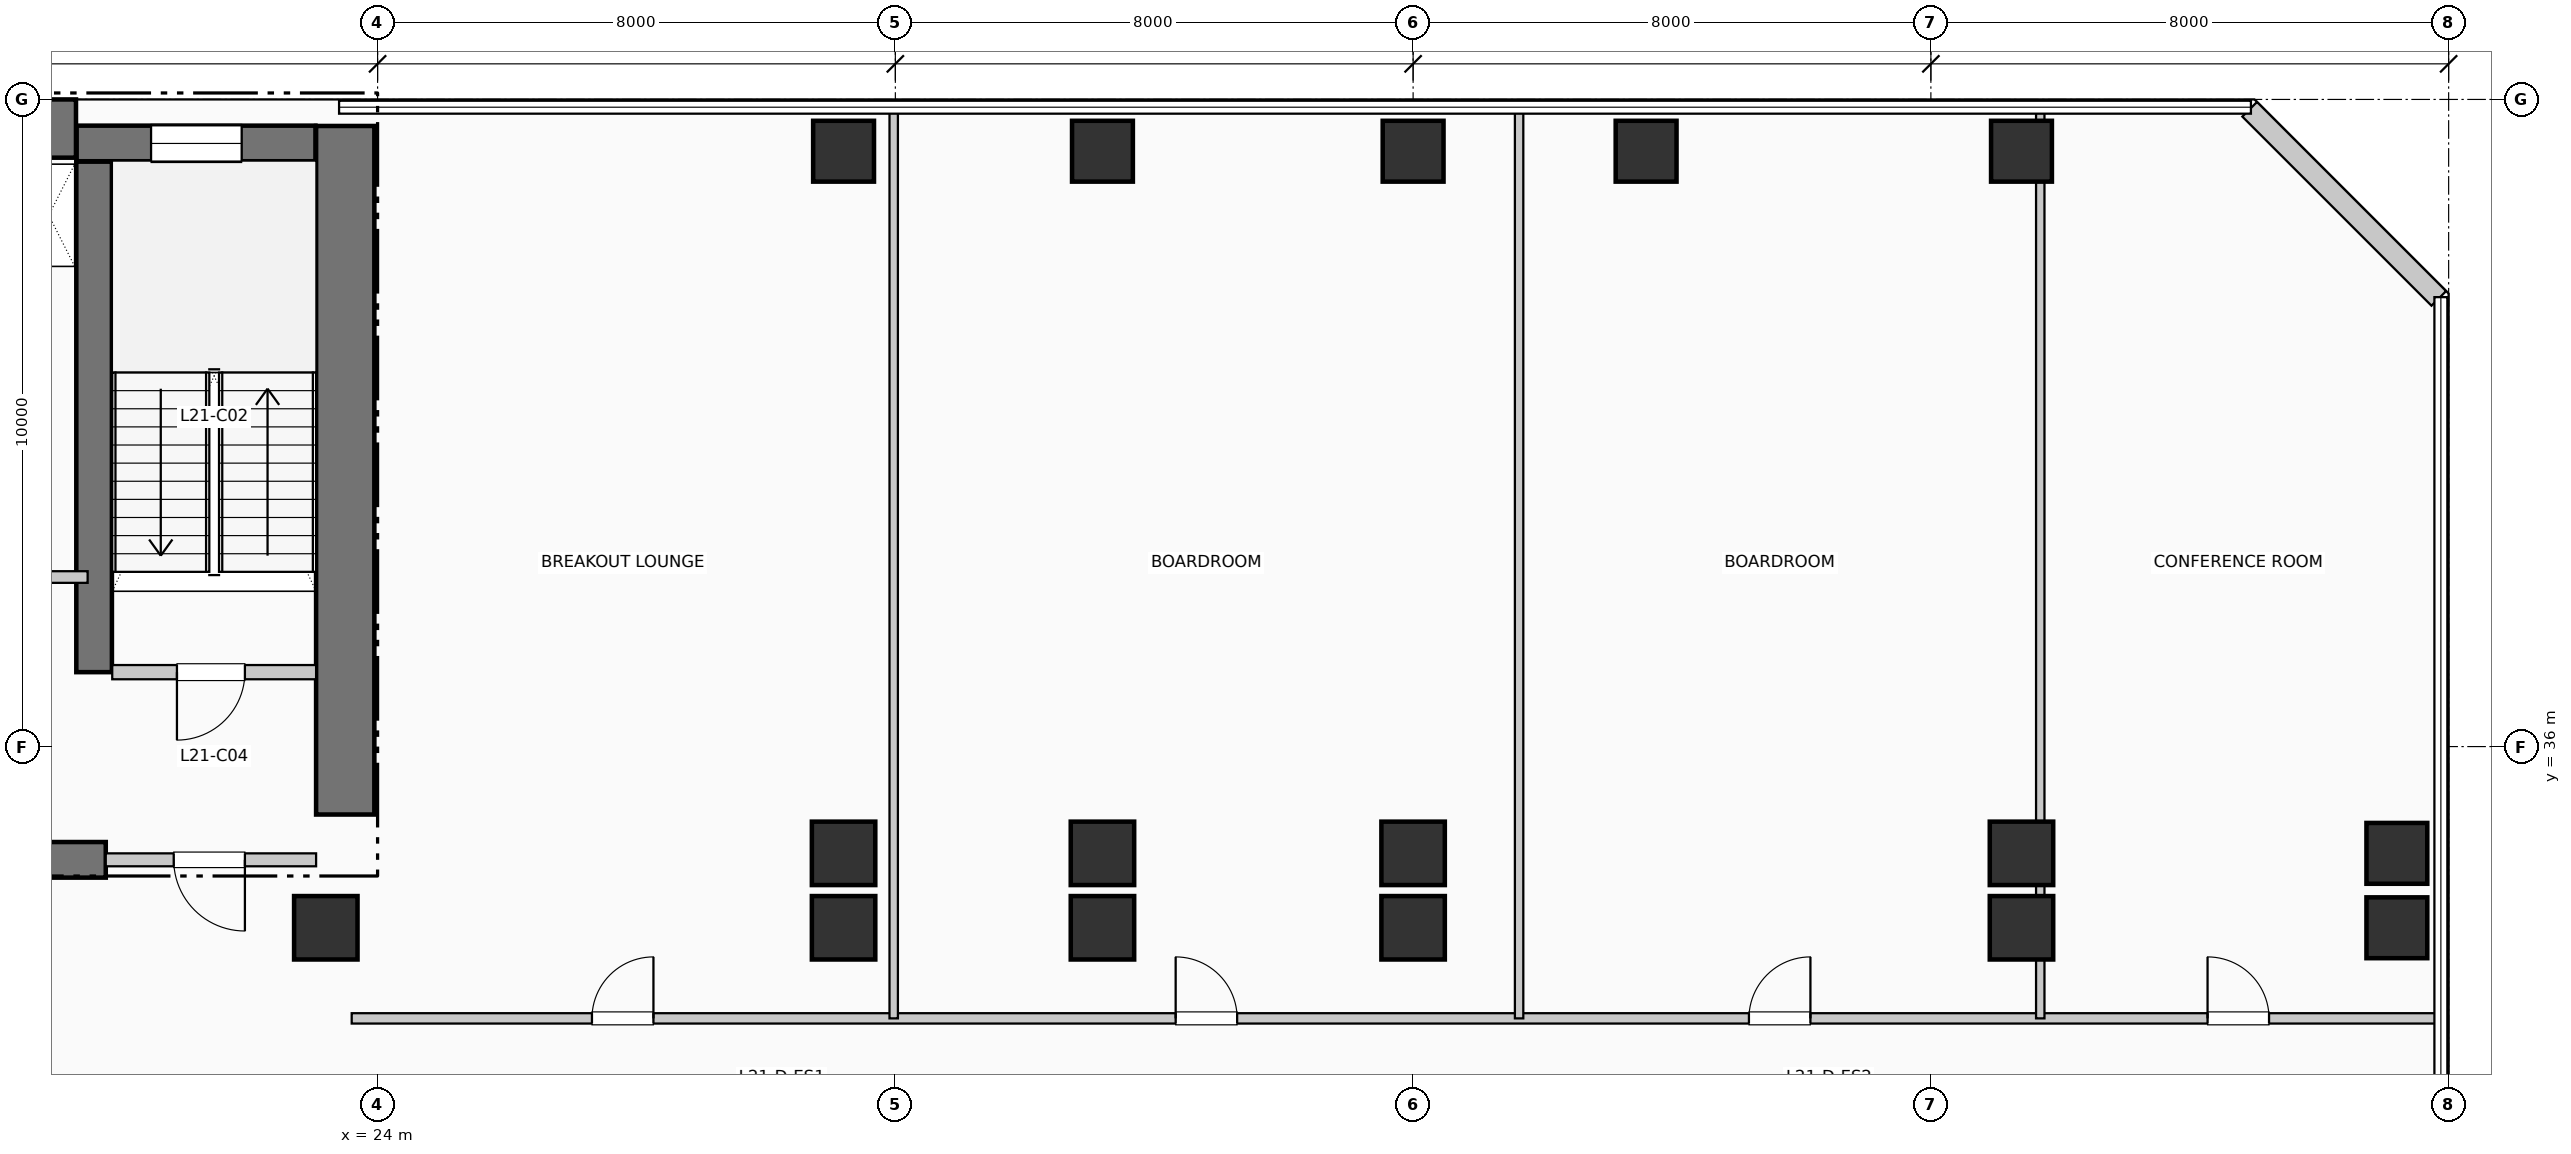
"""IFC4 building model, lengths in metres.
Left out: names, types, materials, properties, quantities, classifications, styles, units other than length and angle.
Written with IfcOpenShell. Run it as: python <this file> out.ifc"""

import sys

from ifc_helpers import new_model, si_unit, direction, frame, frame_2d, origin, origin_2d, place, context, subcontext, project, spatial, rectangle, extrude, element, fill, save


model = new_model("IFC4")
c1 = context("Model", 3, precision=1e-05, world=origin(), true_north=direction((0.0, 1.0)))
c2 = subcontext(c1, "Body", "Model", "MODEL_VIEW")
j1 = project(units=[si_unit("LENGTHUNIT", "METRE"), si_unit("PLANEANGLEUNIT", "RADIAN")], contexts=[c1])
p1 = place(None, origin())
s1 = spatial("IfcSite", under=j1, at=p1, CompositionType="ELEMENT")
p2 = place(p1, origin())
s2 = spatial("IfcBuilding", under=s1, at=p2, CompositionType="ELEMENT")
p3 = place(p2, frame((0.0, 0.0, 89.76)))
s3 = spatial("IfcBuildingStorey", under=s2, at=p3, CompositionType="ELEMENT", Elevation=89.76)
p4 = place(p3, frame((5.36, 45.55, 0.0), z_axis=(0.0, 0.0, 1.0), x_axis=(1.0, 0.0, 0.0)))
e1 = element("IfcWall", 1, at=p4, inside=s3, PredefinedType="SHEAR", context=c2, shape_type="SweptSolid", body=[
    extrude(rectangle(XDim=13.98, YDim=0.9, at=frame_2d((6.99, 0.0))), origin(), (0.0, 0.0, 1.0), 3.96),
])
p5 = place(p3, frame((23.5, 34.95, 0.0), z_axis=(0.0, 0.0, 1.0), x_axis=(0.0, 1.0, 0.0)))
e2 = element("IfcWall", 2, at=p5, inside=s3, PredefinedType="SHEAR", context=c2, shape_type="SweptSolid", body=[
    extrude(rectangle(XDim=10.64, YDim=0.9, at=frame_2d((5.32, 0.0))), origin(), (0.0, 0.0, 1.0), 3.96),
])
p6 = place(p3, frame((13.68, 34.25, 0.0), z_axis=(0.0, 0.0, 1.0), x_axis=(1.0, 0.0, 0.0)))
e3 = element("IfcWall", 3, at=p6, inside=s3, PredefinedType="SHEAR", context=c2, shape_type="SweptSolid", body=[
    extrude(rectangle(XDim=6.12, YDim=0.55, at=frame_2d((3.06, 0.0))), origin(), (0.0, 0.0, 1.0), 3.96),
])
p7 = place(p3, frame((19.62, 37.15, 0.0), z_axis=(0.0, 0.0, 1.0), x_axis=(0.0, 1.0, 0.0)))
e4 = element("IfcWall", 4, at=p7, inside=s3, PredefinedType="SHEAR", context=c2, shape_type="SweptSolid", body=[
    extrude(rectangle(XDim=7.89, YDim=0.55, at=frame_2d((3.945, 0.0))), origin(), (0.0, 0.0, 1.0), 3.96),
])
p8 = place(p3, frame((19.35, 45.32, 0.0), z_axis=(0.0, 0.0, 1.0), x_axis=(1.0, 0.0, 0.0)))
e5 = element("IfcWall", 5, at=p8, inside=s3, PredefinedType="SHEAR", context=c2, shape_type="SweptSolid", body=[
    extrude(rectangle(XDim=3.69, YDim=0.55, at=frame_2d((1.845, 0.0))), origin(), (0.0, 0.0, 1.0), 3.96),
])
p9 = place(p8, frame((1.15, 0.0, 1.05)))
e6 = element("IfcOpeningElement", 6, at=p9, cuts=e5, PredefinedType="OPENING", context=c2, shape_type="SweptSolid", body=[
    extrude(rectangle(XDim=1.4, YDim=1.8, at=frame_2d((0.7, 0.9))), frame((0.0, 0.285, 0.0), z_axis=(0.0, -1.0, 0.0), x_axis=(1.0, 0.0, 0.0)), (0.0, 0.0, 1.0), 0.57),
])
for number, where, z_axis, x_axis in (
    (7, (23.2, 33.2, 0.0), (0.0, 0.0, 1.0), (1.0, 0.0, 0.0)),
    (8, (31.2, 33.2, 0.0), (0.0, 0.0, 1.0), (1.0, 0.0, 0.0)),
    (9, (31.2, 34.35, 0.0), (0.0, 0.0, 1.0), (1.0, 0.0, 0.0)),
):
    element("IfcColumn", number, at=place(p3, frame(where, z_axis=z_axis, x_axis=x_axis)), inside=s3, PredefinedType="COLUMN", context=c2, shape_type="SweptSolid", body=[
        extrude(rectangle(XDim=0.98, YDim=0.98, at=origin_2d()), origin(), (0.0, 0.0, 1.0), 3.96),
    ])
p10 = place(p3, frame((31.2, 45.2, 0.0), z_axis=(0.0, 0.0, 1.0), x_axis=(1.0, 0.0, 0.0)))
e10 = element("IfcColumn", 10, at=p10, inside=s3, PredefinedType="COLUMN", context=c2, shape_type="SweptSolid", body=[
    extrude(rectangle(XDim=0.94, YDim=0.94, at=origin_2d()), origin(), (0.0, 0.0, 1.0), 3.96),
])
for number, where, z_axis, x_axis in (
    (11, (35.2, 33.2, 0.0), (0.0, 0.0, 1.0), (1.0, 0.0, 0.0)),
    (12, (35.2, 34.35, 0.0), (0.0, 0.0, 1.0), (1.0, 0.0, 0.0)),
):
    element("IfcColumn", number, at=place(p3, frame(where, z_axis=z_axis, x_axis=x_axis)), inside=s3, PredefinedType="COLUMN", context=c2, shape_type="SweptSolid", body=[
        extrude(rectangle(XDim=0.98, YDim=0.98, at=origin_2d()), origin(), (0.0, 0.0, 1.0), 3.96),
    ])
p11 = place(p3, frame((35.2, 45.2, 0.0), z_axis=(0.0, 0.0, 1.0), x_axis=(1.0, 0.0, 0.0)))
e13 = element("IfcColumn", 13, at=p11, inside=s3, PredefinedType="COLUMN", context=c2, shape_type="SweptSolid", body=[
    extrude(rectangle(XDim=0.94, YDim=0.94, at=origin_2d()), origin(), (0.0, 0.0, 1.0), 3.96),
])
for number, where, z_axis, x_axis in (
    (14, (40.0, 33.2, 0.0), (0.0, 0.0, 1.0), (1.0, 0.0, 0.0)),
    (15, (40.0, 34.35, 0.0), (0.0, 0.0, 1.0), (1.0, 0.0, 0.0)),
):
    element("IfcColumn", number, at=place(p3, frame(where, z_axis=z_axis, x_axis=x_axis)), inside=s3, PredefinedType="COLUMN", context=c2, shape_type="SweptSolid", body=[
        extrude(rectangle(XDim=0.98, YDim=0.98, at=origin_2d()), origin(), (0.0, 0.0, 1.0), 3.96),
    ])
for number, where, z_axis, x_axis in (
    (16, (40.0, 45.2, 0.0), (0.0, 0.0, 1.0), (1.0, 0.0, 0.0)),
    (17, (43.6, 45.2, 0.0), (0.0, 0.0, 1.0), (1.0, 0.0, 0.0)),
):
    element("IfcColumn", number, at=place(p3, frame(where, z_axis=z_axis, x_axis=x_axis)), inside=s3, PredefinedType="COLUMN", context=c2, shape_type="SweptSolid", body=[
        extrude(rectangle(XDim=0.94, YDim=0.94, at=origin_2d()), origin(), (0.0, 0.0, 1.0), 3.96),
    ])
for number, where, z_axis, x_axis in (
    (18, (49.4, 33.2, 0.0), (0.0, 0.0, 1.0), (1.0, 0.0, 0.0)),
    (19, (49.4, 34.35, 0.0), (0.0, 0.0, 1.0), (1.0, 0.0, 0.0)),
):
    element("IfcColumn", number, at=place(p3, frame(where, z_axis=z_axis, x_axis=x_axis)), inside=s3, PredefinedType="COLUMN", context=c2, shape_type="SweptSolid", body=[
        extrude(rectangle(XDim=0.98, YDim=0.98, at=origin_2d()), origin(), (0.0, 0.0, 1.0), 3.96),
    ])
for number, where, z_axis, x_axis in (
    (20, (49.4, 45.2, 0.0), (0.0, 0.0, 1.0), (1.0, 0.0, 0.0)),
    (21, (55.2, 33.2, 0.0), (0.0, 0.0, 1.0), (1.0, 0.0, 0.0)),
    (22, (55.2, 34.35, 0.0), (0.0, 0.0, 1.0), (1.0, 0.0, 0.0)),
):
    element("IfcColumn", number, at=place(p3, frame(where, z_axis=z_axis, x_axis=x_axis)), inside=s3, PredefinedType="COLUMN", context=c2, shape_type="SweptSolid", body=[
        extrude(rectangle(XDim=0.94, YDim=0.94, at=origin_2d()), origin(), (0.0, 0.0, 1.0), 3.96),
    ])
p12 = place(p3, frame((55.848, 42.926, 0.0), z_axis=(0.0, 0.0, 1.0), x_axis=(-0.707106781187, 0.707106781187, 0.0)))
e23 = element("IfcWall", 23, at=p12, inside=s3, PredefinedType="SOLIDWALL", context=c2, shape_type="SweptSolid", body=[
    extrude(rectangle(XDim=4.133, YDim=0.32, at=frame_2d((2.066, 0.0))), origin(), (0.0, 0.0, 1.0), 3.61),
])
p13 = place(p3, frame((19.9, 37.15, 0.0), z_axis=(0.0, 0.0, 1.0), x_axis=(1.0, 0.0, 0.0)))
e24 = element("IfcWall", 24, at=p13, inside=s3, PredefinedType="PARTITIONING", context=c2, shape_type="SweptSolid", body=[
    extrude(rectangle(XDim=3.15, YDim=0.22, at=frame_2d((1.575, 0.0))), origin(), (0.0, 0.0, 1.0), 3.61),
])
p14 = place(p13, frame((2.05, 0.0, 0.0), z_axis=(0.0, 0.0, 1.0), x_axis=(-1.0, 0.0, 0.0)))
e25 = element("IfcOpeningElement", 25, at=p14, cuts=e24, PredefinedType="OPENING", context=c2, shape_type="SweptSolid", body=[
    extrude(rectangle(XDim=1.05, YDim=2.15, at=frame_2d((0.525, 1.075))), frame((0.0, 0.12, 0.0), z_axis=(0.0, -1.0, 0.0), x_axis=(1.0, 0.0, 0.0)), (0.0, 0.0, 1.0), 0.24),
])
p15 = place(p3, frame((19.8, 34.25, 0.0), z_axis=(0.0, 0.0, 1.0), x_axis=(1.0, 0.0, 0.0)))
e26 = element("IfcWall", 26, at=p15, inside=s3, PredefinedType="PARTITIONING", context=c2, shape_type="SweptSolid", body=[
    extrude(rectangle(XDim=3.25, YDim=0.2, at=frame_2d((1.625, 0.0))), origin(), (0.0, 0.0, 1.0), 3.61),
])
p16 = place(p15, frame((2.15, 0.0, 0.0), z_axis=(0.0, 0.0, 1.0), x_axis=(-1.0, 0.0, 0.0)))
e27 = element("IfcOpeningElement", 27, at=p16, cuts=e26, PredefinedType="OPENING", context=c2, shape_type="SweptSolid", body=[
    extrude(rectangle(XDim=1.1, YDim=2.15, at=frame_2d((0.55, 1.075))), frame((0.0, 0.11, 0.0), z_axis=(0.0, -1.0, 0.0), x_axis=(1.0, 0.0, 0.0)), (0.0, 0.0, 1.0), 0.22),
])
p17 = place(p3, frame((17.68, 38.62, 0.0), z_axis=(0.0, 0.0, 1.0), x_axis=(1.0, 0.0, 0.0)))
e28 = element("IfcWall", 28, at=p17, inside=s3, PredefinedType="PARTITIONING", context=c2, shape_type="SweptSolid", body=[
    extrude(rectangle(XDim=1.84, YDim=0.18, at=frame_2d((0.92, 0.0))), origin(), (0.0, 0.0, 1.0), 3.61),
])
p18 = place(p17, frame((0.24, 0.0, 0.0)))
e29 = element("IfcOpeningElement", 29, at=p18, cuts=e28, PredefinedType="OPENING", context=c2, shape_type="SweptSolid", body=[
    extrude(rectangle(XDim=0.92, YDim=2.1, at=frame_2d((0.46, 1.05))), frame((0.0, 0.1, 0.0), z_axis=(0.0, -1.0, 0.0), x_axis=(1.0, 0.0, 0.0)), (0.0, 0.0, 1.0), 0.2),
])
p19 = place(p3, frame((23.6, 31.8, 0.0), z_axis=(0.0, 0.0, 1.0), x_axis=(1.0, 0.0, 0.0)))
e30 = element("IfcWall", 30, at=p19, inside=s3, PredefinedType="PARTITIONING", context=c2, shape_type="SweptSolid", body=[
    extrude(rectangle(XDim=32.21, YDim=0.16, at=frame_2d((16.105, 0.0))), origin(), (0.0, 0.0, 1.0), 3.61),
])
p20 = place(p19, frame((3.712, 0.0, 0.0)))
e31 = element("IfcOpeningElement", 31, at=p20, cuts=e30, PredefinedType="OPENING", context=c2, shape_type="SweptSolid", body=[
    extrude(rectangle(XDim=0.95, YDim=2.15, at=frame_2d((0.475, 1.075))), frame((0.0, 0.09, 0.0), z_axis=(0.0, -1.0, 0.0), x_axis=(1.0, 0.0, 0.0)), (0.0, 0.0, 1.0), 0.18),
])
p21 = place(p19, frame((12.731, 0.0, 0.0)))
e32 = element("IfcOpeningElement", 32, at=p21, cuts=e30, PredefinedType="OPENING", context=c2, shape_type="SweptSolid", body=[
    extrude(rectangle(XDim=0.95, YDim=2.15, at=frame_2d((0.475, 1.075))), frame((0.0, 0.09, 0.0), z_axis=(0.0, -1.0, 0.0), x_axis=(1.0, 0.0, 0.0)), (0.0, 0.0, 1.0), 0.18),
])
p22 = place(p19, frame((21.589, 0.0, 0.0)))
e33 = element("IfcOpeningElement", 33, at=p22, cuts=e30, PredefinedType="OPENING", context=c2, shape_type="SweptSolid", body=[
    extrude(rectangle(XDim=0.95, YDim=2.15, at=frame_2d((0.475, 1.075))), frame((0.0, 0.09, 0.0), z_axis=(0.0, -1.0, 0.0), x_axis=(1.0, 0.0, 0.0)), (0.0, 0.0, 1.0), 0.18),
])
p23 = place(p19, frame((28.675, 0.0, 0.0)))
e34 = element("IfcOpeningElement", 34, at=p23, cuts=e30, PredefinedType="OPENING", context=c2, shape_type="SweptSolid", body=[
    extrude(rectangle(XDim=0.95, YDim=2.15, at=frame_2d((0.475, 1.075))), frame((0.0, 0.09, 0.0), z_axis=(0.0, -1.0, 0.0), x_axis=(1.0, 0.0, 0.0)), (0.0, 0.0, 1.0), 0.18),
])
for number, where, z_axis, x_axis in (
    (35, (31.975, 31.8, 0.0), (0.0, 0.0, 1.0), (0.0, 1.0, 0.0)),
    (36, (41.638, 31.8, 0.0), (0.0, 0.0, 1.0), (0.0, 1.0, 0.0)),
):
    element("IfcWall", number, at=place(p3, frame(where, z_axis=z_axis, x_axis=x_axis)), inside=s3, PredefinedType="PARTITIONING", context=c2, shape_type="SweptSolid", body=[
        extrude(rectangle(XDim=14.01, YDim=0.13, at=frame_2d((7.005, 0.0))), origin(), (0.0, 0.0, 1.0), 3.61),
    ])
p24 = place(p3, frame((49.69, 31.8, 0.0), z_axis=(0.0, 0.0, 1.0), x_axis=(0.0, 1.0, 0.0)))
e37 = element("IfcWall", 37, at=p24, inside=s3, PredefinedType="PARTITIONING", context=c2, shape_type="SweptSolid", body=[
    extrude(rectangle(XDim=14.01, YDim=0.13, at=frame_2d((7.005, 0.0))), origin(), (0.0, 0.0, 1.0), 2.895),
])
p25 = place(p9, origin())
e38 = element("IfcWindow", 38, at=p25, inside=s3, PartitioningType="SINGLE_PANEL", PredefinedType="WINDOW", context=c2, shape_type="SweptSolid", body=[
    extrude(rectangle(XDim=1.4, YDim=1.8, at=frame_2d((0.7, 0.9))), frame((0.0, 0.03, 0.0), z_axis=(0.0, -1.0, 0.0), x_axis=(1.0, 0.0, 0.0)), (0.0, 0.0, 1.0), 0.06),
])
fill(e6, e38)
p26 = place(p14, origin())
e39 = element("IfcDoor", 39, at=p26, inside=s3, OperationType="SINGLE_SWING_LEFT", PredefinedType="DOOR", context=c2, shape_type="SweptSolid", body=[
    extrude(rectangle(XDim=1.05, YDim=2.15, at=frame_2d((0.525, 1.075))), frame((0.0, 0.025, 0.0), z_axis=(0.0, -1.0, 0.0), x_axis=(1.0, 0.0, 0.0)), (0.0, 0.0, 1.0), 0.05),
])
fill(e25, e39)
p27 = place(p16, origin())
e40 = element("IfcDoor", 40, at=p27, inside=s3, OperationType="SINGLE_SWING_RIGHT", PredefinedType="DOOR", context=c2, shape_type="SweptSolid", body=[
    extrude(rectangle(XDim=1.1, YDim=2.15, at=frame_2d((0.55, 1.075))), frame((0.0, 0.025, 0.0), z_axis=(0.0, -1.0, 0.0), x_axis=(1.0, 0.0, 0.0)), (0.0, 0.0, 1.0), 0.05),
])
fill(e27, e40)
p28 = place(p20, origin())
e41 = element("IfcDoor", 41, at=p28, inside=s3, OperationType="SINGLE_SWING_RIGHT", PredefinedType="DOOR", context=c2, shape_type="SweptSolid", body=[
    extrude(rectangle(XDim=0.95, YDim=2.15, at=frame_2d((0.475, 1.075))), frame((0.0, 0.025, 0.0), z_axis=(0.0, -1.0, 0.0), x_axis=(1.0, 0.0, 0.0)), (0.0, 0.0, 1.0), 0.05),
])
fill(e31, e41)
p29 = place(p21, origin())
e42 = element("IfcDoor", 42, at=p29, inside=s3, OperationType="SINGLE_SWING_LEFT", PredefinedType="DOOR", context=c2, shape_type="SweptSolid", body=[
    extrude(rectangle(XDim=0.95, YDim=2.15, at=frame_2d((0.475, 1.075))), frame((0.0, 0.025, 0.0), z_axis=(0.0, -1.0, 0.0), x_axis=(1.0, 0.0, 0.0)), (0.0, 0.0, 1.0), 0.05),
])
fill(e32, e42)
p30 = place(p22, origin())
e43 = element("IfcDoor", 43, at=p30, inside=s3, OperationType="SINGLE_SWING_RIGHT", PredefinedType="DOOR", context=c2, shape_type="SweptSolid", body=[
    extrude(rectangle(XDim=0.95, YDim=2.15, at=frame_2d((0.475, 1.075))), frame((0.0, 0.025, 0.0), z_axis=(0.0, -1.0, 0.0), x_axis=(1.0, 0.0, 0.0)), (0.0, 0.0, 1.0), 0.05),
])
fill(e33, e43)
p31 = place(p23, origin())
e44 = element("IfcDoor", 44, at=p31, inside=s3, OperationType="SINGLE_SWING_LEFT", PredefinedType="DOOR", context=c2, shape_type="SweptSolid", body=[
    extrude(rectangle(XDim=0.95, YDim=2.15, at=frame_2d((0.475, 1.075))), frame((0.0, 0.025, 0.0), z_axis=(0.0, -1.0, 0.0), x_axis=(1.0, 0.0, 0.0)), (0.0, 0.0, 1.0), 0.05),
])
fill(e34, e44)
save(model, sys.argv[1])
